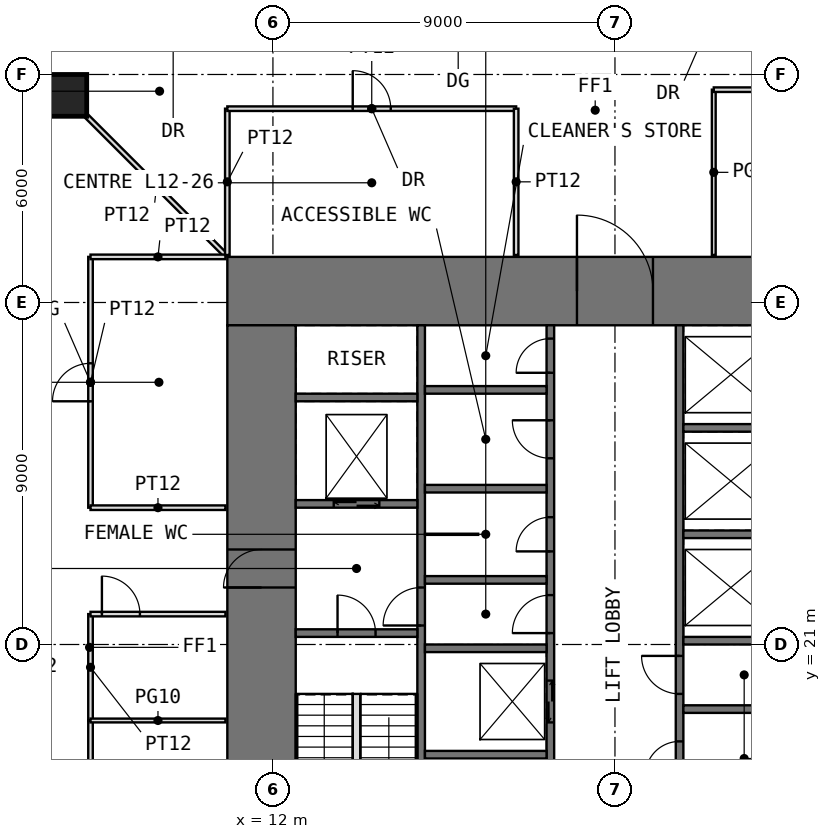
"""IFC4 building model, lengths in metres.
Left out: names, types, materials, properties, quantities, classifications, styles, units other than length and angle.
Written with IfcOpenShell. Run it as: python <this file> out.ifc"""

import sys

from ifc_helpers import new_model, si_unit, direction, frame, frame_2d, origin, origin_2d, place, context, subcontext, project, spatial, rectangle, extrude, element, fill, save


model = new_model("IFC4")
c1 = context("Model", 3, precision=1e-05, world=origin(), true_north=direction((0.0, 1.0)))
c2 = subcontext(c1, "Body", "Model", "MODEL_VIEW")
j1 = project(units=[si_unit("LENGTHUNIT", "METRE"), si_unit("PLANEANGLEUNIT", "RADIAN")], contexts=[c1])
p1 = place(None, origin())
s1 = spatial("IfcSite", under=j1, at=p1, CompositionType="ELEMENT")
p2 = place(p1, origin())
s2 = spatial("IfcBuilding", under=s1, at=p2, CompositionType="ELEMENT")
p3 = place(p2, frame((0.0, 0.0, 54.5)))
s3 = spatial("IfcBuildingStorey", under=s2, at=p3, CompositionType="ELEMENT", Elevation=54.5)
p4 = place(p3, frame((6.55, 35.45, 0.0), z_axis=(0.0, 0.0, 1.0), x_axis=(1.0, 0.0, 0.0)))
e1 = element("IfcColumn", 1, at=p4, inside=s3, PredefinedType="COLUMN", context=c2, shape_type="SweptSolid", body=[
    extrude(rectangle(XDim=1.1, YDim=1.1, at=origin_2d()), origin(), (0.0, 0.0, 1.0), 4.0),
])
p5 = place(p3, frame((10.8, 30.3, -0.05), z_axis=(0.0, 0.0, 1.0), x_axis=(1.0, 0.0, 0.0)))
e2 = element("IfcWall", 2, at=p5, inside=s3, PredefinedType="SHEAR", context=c2, shape_type="SweptSolid", body=[
    extrude(rectangle(XDim=20.4, YDim=1.8, at=frame_2d((10.2, 0.0))), origin(), (0.0, 0.0, 1.0), 4.0),
])
p6 = place(p5, frame((9.2, 0.0, 0.05)))
e3 = element("IfcOpeningElement", 3, at=p6, cuts=e2, PredefinedType="OPENING", context=c2, shape_type="SweptSolid", body=[
    extrude(rectangle(XDim=2.0, YDim=2.2, at=frame_2d((1.0, 1.1))), frame((0.0, 0.91, 0.0), z_axis=(0.0, -1.0, 0.0), x_axis=(1.0, 0.0, 0.0)), (0.0, 0.0, 1.0), 1.82),
])
p7 = place(p3, frame((11.7, 12.6, -0.05), z_axis=(0.0, 0.0, 1.0), x_axis=(0.0, 1.0, 0.0)))
e4 = element("IfcWall", 4, at=p7, inside=s3, PredefinedType="SHEAR", context=c2, shape_type="SweptSolid", body=[
    extrude(rectangle(XDim=16.8, YDim=1.8, at=frame_2d((8.4, 0.0))), origin(), (0.0, 0.0, 1.0), 4.0),
])
p8 = place(p7, frame((9.9, 0.0, 0.05)))
e5 = element("IfcOpeningElement", 5, at=p8, cuts=e4, PredefinedType="OPENING", context=c2, shape_type="SweptSolid", body=[
    extrude(rectangle(XDim=1.0, YDim=2.2, at=frame_2d((0.5, 1.1))), frame((0.0, 0.91, 0.0), z_axis=(0.0, -1.0, 0.0), x_axis=(1.0, 0.0, 0.0)), (0.0, 0.0, 1.0), 1.82),
])
p9 = place(p3, frame((15.9, 12.6, -0.05), z_axis=(0.0, 0.0, 1.0), x_axis=(0.0, 1.0, 0.0)))
e6 = element("IfcWall", 6, at=p9, inside=s3, PredefinedType="SHEAR", context=c2, shape_type="SweptSolid", body=[
    extrude(rectangle(XDim=16.8, YDim=0.2, at=frame_2d((8.4, 0.0))), origin(), (0.0, 0.0, 1.0), 4.0),
])
p10 = place(p9, frame((8.9, 0.0, 0.05)))
e7 = element("IfcOpeningElement", 7, at=p10, cuts=e6, PredefinedType="OPENING", context=c2, shape_type="SweptSolid", body=[
    extrude(rectangle(XDim=1.0, YDim=2.2, at=frame_2d((0.5, 1.1))), frame((0.0, 0.11, 0.0), z_axis=(0.0, -1.0, 0.0), x_axis=(1.0, 0.0, 0.0)), (0.0, 0.0, 1.0), 0.22),
])
p11 = place(p3, frame((19.3, 12.6, -0.05), z_axis=(0.0, 0.0, 1.0), x_axis=(0.0, 1.0, 0.0)))
e8 = element("IfcWall", 8, at=p11, inside=s3, PredefinedType="SHEAR", context=c2, shape_type="SweptSolid", body=[
    extrude(rectangle(XDim=16.8, YDim=0.2, at=frame_2d((8.4, 0.0))), origin(), (0.0, 0.0, 1.0), 4.0),
])
p12 = place(p11, frame((8.7, 0.0, 0.05)))
e9 = element("IfcOpeningElement", 9, at=p12, cuts=e8, PredefinedType="OPENING", context=c2, shape_type="SweptSolid", body=[
    extrude(rectangle(XDim=1.0, YDim=2.2, at=frame_2d((0.5, 1.1))), frame((0.0, 0.11, 0.0), z_axis=(0.0, -1.0, 0.0), x_axis=(1.0, 0.0, 0.0)), (0.0, 0.0, 1.0), 0.22),
])
p13 = place(p11, frame((10.85, 0.0, 0.05)))
e10 = element("IfcOpeningElement", 10, at=p13, cuts=e8, PredefinedType="OPENING", context=c2, shape_type="SweptSolid", body=[
    extrude(rectangle(XDim=0.9, YDim=2.2, at=frame_2d((0.45, 1.1))), frame((0.0, 0.11, 0.0), z_axis=(0.0, -1.0, 0.0), x_axis=(1.0, 0.0, 0.0)), (0.0, 0.0, 1.0), 0.22),
])
p14 = place(p11, frame((13.3, 0.0, 0.05)))
e11 = element("IfcOpeningElement", 11, at=p14, cuts=e8, PredefinedType="OPENING", context=c2, shape_type="SweptSolid", body=[
    extrude(rectangle(XDim=1.0, YDim=2.2, at=frame_2d((0.5, 1.1))), frame((0.0, 0.11, 0.0), z_axis=(0.0, -1.0, 0.0), x_axis=(1.0, 0.0, 0.0)), (0.0, 0.0, 1.0), 0.22),
])
p15 = place(p11, frame((15.55, 0.0, 0.05)))
e12 = element("IfcOpeningElement", 12, at=p15, cuts=e8, PredefinedType="OPENING", context=c2, shape_type="SweptSolid", body=[
    extrude(rectangle(XDim=0.9, YDim=2.2, at=frame_2d((0.45, 1.1))), frame((0.0, 0.11, 0.0), z_axis=(0.0, -1.0, 0.0), x_axis=(1.0, 0.0, 0.0)), (0.0, 0.0, 1.0), 0.22),
])
p16 = place(p11, frame((0.75, 0.0, 0.05)))
e13 = element("IfcOpeningElement", 13, at=p16, cuts=e8, PredefinedType="OPENING", context=c2, shape_type="SweptSolid", body=[
    extrude(rectangle(XDim=1.1, YDim=2.2, at=frame_2d((0.55, 1.1))), frame((0.0, 0.11, 0.0), z_axis=(0.0, -1.0, 0.0), x_axis=(1.0, 0.0, 0.0)), (0.0, 0.0, 1.0), 0.22),
])
p17 = place(p11, frame((3.55, 0.0, 0.05)))
e14 = element("IfcOpeningElement", 14, at=p17, cuts=e8, PredefinedType="OPENING", context=c2, shape_type="SweptSolid", body=[
    extrude(rectangle(XDim=1.1, YDim=2.2, at=frame_2d((0.55, 1.1))), frame((0.0, 0.11, 0.0), z_axis=(0.0, -1.0, 0.0), x_axis=(1.0, 0.0, 0.0)), (0.0, 0.0, 1.0), 0.22),
])
p18 = place(p11, frame((6.35, 0.0, 0.05)))
e15 = element("IfcOpeningElement", 15, at=p18, cuts=e8, PredefinedType="OPENING", context=c2, shape_type="SweptSolid", body=[
    extrude(rectangle(XDim=1.1, YDim=2.2, at=frame_2d((0.55, 1.1))), frame((0.0, 0.11, 0.0), z_axis=(0.0, -1.0, 0.0), x_axis=(1.0, 0.0, 0.0)), (0.0, 0.0, 1.0), 0.22),
])
p19 = place(p3, frame((22.7, 12.6, -0.05), z_axis=(0.0, 0.0, 1.0), x_axis=(0.0, 1.0, 0.0)))
e16 = element("IfcWall", 16, at=p19, inside=s3, PredefinedType="SHEAR", context=c2, shape_type="SweptSolid", body=[
    extrude(rectangle(XDim=16.8, YDim=0.2, at=frame_2d((8.4, 0.0))), origin(), (0.0, 0.0, 1.0), 4.0),
])
p20 = place(p19, frame((7.1, 0.0, 0.05)))
e17 = element("IfcOpeningElement", 17, at=p20, cuts=e16, PredefinedType="OPENING", context=c2, shape_type="SweptSolid", body=[
    extrude(rectangle(XDim=1.0, YDim=2.2, at=frame_2d((0.5, 1.1))), frame((0.0, 0.11, 0.0), z_axis=(0.0, -1.0, 0.0), x_axis=(1.0, 0.0, 0.0)), (0.0, 0.0, 1.0), 0.22),
])
p21 = place(p19, frame((1.55, 0.0, 0.05)))
e18 = element("IfcOpeningElement", 18, at=p21, cuts=e16, PredefinedType="OPENING", context=c2, shape_type="SweptSolid", body=[
    extrude(rectangle(XDim=0.9, YDim=2.2, at=frame_2d((0.45, 1.1))), frame((0.0, 0.11, 0.0), z_axis=(0.0, -1.0, 0.0), x_axis=(1.0, 0.0, 0.0)), (0.0, 0.0, 1.0), 0.22),
])
p22 = place(p19, frame((4.95, 0.0, 0.05)))
e19 = element("IfcOpeningElement", 19, at=p22, cuts=e16, PredefinedType="OPENING", context=c2, shape_type="SweptSolid", body=[
    extrude(rectangle(XDim=0.9, YDim=2.2, at=frame_2d((0.45, 1.1))), frame((0.0, 0.11, 0.0), z_axis=(0.0, -1.0, 0.0), x_axis=(1.0, 0.0, 0.0)), (0.0, 0.0, 1.0), 0.22),
])
p23 = place(p3, frame((12.6, 21.3, -0.05), z_axis=(0.0, 0.0, 1.0), x_axis=(1.0, 0.0, 0.0)))
e20 = element("IfcWall", 20, at=p23, inside=s3, PredefinedType="SHEAR", context=c2, shape_type="SweptSolid", body=[
    extrude(rectangle(XDim=3.2, YDim=0.2, at=frame_2d((1.6, 0.0))), origin(), (0.0, 0.0, 1.0), 4.0),
])
p24 = place(p23, frame((1.1, 0.0, 0.05)))
e21 = element("IfcOpeningElement", 21, at=p24, cuts=e20, PredefinedType="OPENING", context=c2, shape_type="SweptSolid", body=[
    extrude(rectangle(XDim=1.0, YDim=2.2, at=frame_2d((0.5, 1.1))), frame((0.0, 0.11, 0.0), z_axis=(0.0, -1.0, 0.0), x_axis=(1.0, 0.0, 0.0)), (0.0, 0.0, 1.0), 0.22),
])
p25 = place(p3, frame((12.6, 24.7, -0.05), z_axis=(0.0, 0.0, 1.0), x_axis=(1.0, 0.0, 0.0)))
e22 = element("IfcWall", 22, at=p25, inside=s3, PredefinedType="SHEAR", context=c2, shape_type="SweptSolid", body=[
    extrude(rectangle(XDim=3.2, YDim=0.2, at=frame_2d((1.6, 0.0))), origin(), (0.0, 0.0, 1.0), 4.0),
])
p26 = place(p25, frame((1.0, 0.0, 0.05)))
e23 = element("IfcOpeningElement", 23, at=p26, cuts=e22, PredefinedType="OPENING", context=c2, shape_type="SweptSolid", body=[
    extrude(rectangle(XDim=1.2, YDim=2.2, at=frame_2d((0.6, 1.1))), frame((0.0, 0.11, 0.0), z_axis=(0.0, -1.0, 0.0), x_axis=(1.0, 0.0, 0.0)), (0.0, 0.0, 1.0), 0.22),
])
for number, where, z_axis, x_axis in (
    (24, (12.6, 27.5, -0.05), (0.0, 0.0, 1.0), (1.0, 0.0, 0.0)),
    (25, (16.0, 18.1, -0.05), (0.0, 0.0, 1.0), (1.0, 0.0, 0.0)),
    (26, (16.0, 20.9, -0.05), (0.0, 0.0, 1.0), (1.0, 0.0, 0.0)),
    (27, (16.0, 22.7, -0.05), (0.0, 0.0, 1.0), (1.0, 0.0, 0.0)),
    (28, (16.0, 25.1, -0.05), (0.0, 0.0, 1.0), (1.0, 0.0, 0.0)),
    (29, (16.0, 27.7, -0.05), (0.0, 0.0, 1.0), (1.0, 0.0, 0.0)),
    (30, (22.8, 19.3, -0.05), (0.0, 0.0, 1.0), (1.0, 0.0, 0.0)),
    (31, (22.8, 21.1, -0.05), (0.0, 0.0, 1.0), (1.0, 0.0, 0.0)),
    (32, (22.8, 23.9, -0.05), (0.0, 0.0, 1.0), (1.0, 0.0, 0.0)),
    (33, (22.8, 26.7, -0.05), (0.0, 0.0, 1.0), (1.0, 0.0, 0.0)),
):
    element("IfcWall", number, at=place(p3, frame(where, z_axis=z_axis, x_axis=x_axis)), inside=s3, PredefinedType="SHEAR", context=c2, shape_type="SweptSolid", body=[
        extrude(rectangle(XDim=3.2, YDim=0.2, at=frame_2d((1.6, 0.0))), origin(), (0.0, 0.0, 1.0), 4.0),
    ])
p27 = place(p3, frame((16.0, 23.9, 0.0), z_axis=(0.0, 0.0, 1.0), x_axis=(1.0, 0.0, 0.0)))
e34 = element("IfcWall", 34, at=p27, inside=s3, PredefinedType="PARTITIONING", context=c2, shape_type="SweptSolid", body=[
    extrude(rectangle(XDim=1.4, YDim=0.03, at=frame_2d((0.7, 0.0))), origin(), (0.0, 0.0, 1.0), 3.75),
])
p28 = place(p3, frame((7.11, 34.89, 0.0), z_axis=(0.0, 0.0, 1.0), x_axis=(0.707106781187, -0.707106781187, 0.0)))
e35 = element("IfcWall", 35, at=p28, inside=s3, PredefinedType="PARTITIONING", context=c2, shape_type="SweptSolid", body=[
    extrude(rectangle(XDim=5.168, YDim=0.12, at=frame_2d((2.584, 0.0))), origin(), (0.0, 0.0, 1.0), 3.75),
])
p29 = place(p3, frame((7.2, 14.0, 0.0), z_axis=(0.0, 0.0, 1.0), x_axis=(0.0, 1.0, 0.0)))
e36 = element("IfcWall", 36, at=p29, inside=s3, PredefinedType="PARTITIONING", context=c2, shape_type="SweptSolid", body=[
    extrude(rectangle(XDim=5.0, YDim=0.12, at=frame_2d((2.5, 0.0))), origin(), (0.0, 0.0, 1.0), 3.75),
])
p30 = place(p29, frame((2.0, 0.0, 0.0)))
e37 = element("IfcOpeningElement", 37, at=p30, cuts=e36, PredefinedType="OPENING", context=c2, shape_type="SweptSolid", body=[
    extrude(rectangle(XDim=1.0, YDim=2.4, at=frame_2d((0.5, 1.2))), frame((0.0, 0.07, 0.0), z_axis=(0.0, -1.0, 0.0), x_axis=(1.0, 0.0, 0.0)), (0.0, 0.0, 1.0), 0.14),
])
p31 = place(p3, frame((7.2, 19.0, 0.0), z_axis=(0.0, 0.0, 1.0), x_axis=(0.0, 1.0, 0.0)))
e38 = element("IfcWall", 38, at=p31, inside=s3, PredefinedType="PARTITIONING", context=c2, shape_type="SweptSolid", body=[
    extrude(rectangle(XDim=2.8, YDim=0.12, at=frame_2d((1.4, 0.0))), origin(), (0.0, 0.0, 1.0), 3.75),
])
p32 = place(p3, frame((7.2, 19.0, 0.0), z_axis=(0.0, 0.0, 1.0), x_axis=(1.0, 0.0, 0.0)))
e39 = element("IfcWall", 39, at=p32, inside=s3, PredefinedType="PARTITIONING", context=c2, shape_type="SweptSolid", body=[
    extrude(rectangle(XDim=3.55, YDim=0.1, at=frame_2d((1.775, 0.0))), origin(), (0.0, 0.0, 1.0), 3.75),
])
p33 = place(p3, frame((7.2, 21.8, 0.0), z_axis=(0.0, 0.0, 1.0), x_axis=(1.0, 0.0, 0.0)))
e40 = element("IfcWall", 40, at=p33, inside=s3, PredefinedType="PARTITIONING", context=c2, shape_type="SweptSolid", body=[
    extrude(rectangle(XDim=3.55, YDim=0.12, at=frame_2d((1.775, 0.0))), origin(), (0.0, 0.0, 1.0), 3.75),
])
p34 = place(p33, frame((0.3, 0.0, 0.0)))
e41 = element("IfcOpeningElement", 41, at=p34, cuts=e40, PredefinedType="OPENING", context=c2, shape_type="SweptSolid", body=[
    extrude(rectangle(XDim=1.0, YDim=2.4, at=frame_2d((0.5, 1.2))), frame((0.0, 0.07, 0.0), z_axis=(0.0, -1.0, 0.0), x_axis=(1.0, 0.0, 0.0)), (0.0, 0.0, 1.0), 0.14),
])
p35 = place(p3, frame((7.2, 24.6, 0.0), z_axis=(0.0, 0.0, 1.0), x_axis=(0.0, 1.0, 0.0)))
e42 = element("IfcWall", 42, at=p35, inside=s3, PredefinedType="PARTITIONING", context=c2, shape_type="SweptSolid", body=[
    extrude(rectangle(XDim=6.6, YDim=0.12, at=frame_2d((3.3, 0.0))), origin(), (0.0, 0.0, 1.0), 3.75),
])
p36 = place(p35, frame((2.8, 0.0, 0.0)))
e43 = element("IfcOpeningElement", 43, at=p36, cuts=e42, PredefinedType="OPENING", context=c2, shape_type="SweptSolid", body=[
    extrude(rectangle(XDim=1.0, YDim=2.4, at=frame_2d((0.5, 1.2))), frame((0.0, 0.07, 0.0), z_axis=(0.0, -1.0, 0.0), x_axis=(1.0, 0.0, 0.0)), (0.0, 0.0, 1.0), 0.14),
])
for number, where, z_axis, x_axis in (
    (44, (7.2, 24.6, 0.0), (0.0, 0.0, 1.0), (1.0, 0.0, 0.0)),
    (45, (7.2, 31.2, 0.0), (0.0, 0.0, 1.0), (1.0, 0.0, 0.0)),
):
    element("IfcWall", number, at=place(p3, frame(where, z_axis=z_axis, x_axis=x_axis)), inside=s3, PredefinedType="PARTITIONING", context=c2, shape_type="SweptSolid", body=[
        extrude(rectangle(XDim=3.55, YDim=0.12, at=frame_2d((1.775, 0.0))), origin(), (0.0, 0.0, 1.0), 3.75),
    ])
p37 = place(p3, frame((10.8, 31.25, 0.0), z_axis=(0.0, 0.0, 1.0), x_axis=(0.0, 1.0, 0.0)))
e46 = element("IfcWall", 46, at=p37, inside=s3, PredefinedType="PARTITIONING", context=c2, shape_type="SweptSolid", body=[
    extrude(rectangle(XDim=3.85, YDim=0.12, at=frame_2d((1.925, 0.0))), origin(), (0.0, 0.0, 1.0), 3.75),
])
p38 = place(p3, frame((10.8, 35.1, 0.0), z_axis=(0.0, 0.0, 1.0), x_axis=(1.0, 0.0, 0.0)))
e47 = element("IfcWall", 47, at=p38, inside=s3, PredefinedType="PARTITIONING", context=c2, shape_type="SweptSolid", body=[
    extrude(rectangle(XDim=7.6, YDim=0.12, at=frame_2d((3.8, 0.0))), origin(), (0.0, 0.0, 1.0), 3.75),
])
p39 = place(p38, frame((3.3, 0.0, 0.0)))
e48 = element("IfcOpeningElement", 48, at=p39, cuts=e47, PredefinedType="OPENING", context=c2, shape_type="SweptSolid", body=[
    extrude(rectangle(XDim=1.0, YDim=2.2, at=frame_2d((0.5, 1.1))), frame((0.0, 0.07, 0.0), z_axis=(0.0, -1.0, 0.0), x_axis=(1.0, 0.0, 0.0)), (0.0, 0.0, 1.0), 0.14),
])
p40 = place(p3, frame((18.4, 31.25, 0.0), z_axis=(0.0, 0.0, 1.0), x_axis=(0.0, 1.0, 0.0)))
e49 = element("IfcWall", 49, at=p40, inside=s3, PredefinedType="PARTITIONING", context=c2, shape_type="SweptSolid", body=[
    extrude(rectangle(XDim=3.85, YDim=0.12, at=frame_2d((1.925, 0.0))), origin(), (0.0, 0.0, 1.0), 3.75),
])
p41 = place(p3, frame((23.6, 31.25, 0.0), z_axis=(0.0, 0.0, 1.0), x_axis=(0.0, 1.0, 0.0)))
e50 = element("IfcWall", 50, at=p41, inside=s3, PredefinedType="PARTITIONING", context=c2, shape_type="SweptSolid", body=[
    extrude(rectangle(XDim=4.35, YDim=0.1, at=frame_2d((2.175, 0.0))), origin(), (0.0, 0.0, 1.0), 3.75),
])
p42 = place(p3, frame((23.6, 35.6, 0.0), z_axis=(0.0, 0.0, 1.0), x_axis=(1.0, 0.0, 0.0)))
e51 = element("IfcWall", 51, at=p42, inside=s3, PredefinedType="PARTITIONING", context=c2, shape_type="SweptSolid", body=[
    extrude(rectangle(XDim=7.6, YDim=0.12, at=frame_2d((3.8, 0.0))), origin(), (0.0, 0.0, 1.0), 3.75),
])
p43 = place(p42, frame((3.3, 0.0, 0.0)))
e52 = element("IfcOpeningElement", 52, at=p43, cuts=e51, PredefinedType="OPENING", context=c2, shape_type="SweptSolid", body=[
    extrude(rectangle(XDim=1.0, YDim=2.4, at=frame_2d((0.5, 1.2))), frame((0.0, 0.07, 0.0), z_axis=(0.0, -1.0, 0.0), x_axis=(1.0, 0.0, 0.0)), (0.0, 0.0, 1.0), 0.14),
])
p44 = place(p3, frame((14.2, 16.62, 0.0), z_axis=(0.0, 0.0, 1.0), x_axis=(0.0, 1.0, 0.0)))
e53 = element("IfcWall", 53, at=p44, inside=s3, PredefinedType="PARTITIONING", context=c2, shape_type="SweptSolid", body=[
    extrude(rectangle(XDim=3.08, YDim=0.2, at=frame_2d((1.54, 0.0))), origin(), (0.0, 0.0, 1.0), 4.0),
])
p45 = place(p6, origin())
e54 = element("IfcDoor", 54, at=p45, inside=s3, OperationType="DOUBLE_DOOR_SINGLE_SWING", PredefinedType="DOOR", context=c2, shape_type="SweptSolid", body=[
    extrude(rectangle(XDim=2.0, YDim=2.2, at=frame_2d((1.0, 1.1))), frame((0.0, 0.025, 0.0), z_axis=(0.0, -1.0, 0.0), x_axis=(1.0, 0.0, 0.0)), (0.0, 0.0, 1.0), 0.05),
])
fill(e3, e54)
p46 = place(p8, origin())
e55 = element("IfcDoor", 55, at=p46, inside=s3, OperationType="SINGLE_SWING_LEFT", PredefinedType="DOOR", context=c2, shape_type="SweptSolid", body=[
    extrude(rectangle(XDim=1.0, YDim=2.2, at=frame_2d((0.5, 1.1))), frame((0.0, 0.025, 0.0), z_axis=(0.0, -1.0, 0.0), x_axis=(1.0, 0.0, 0.0)), (0.0, 0.0, 1.0), 0.05),
])
fill(e5, e55)
p47 = place(p24, origin())
e56 = element("IfcDoor", 56, at=p47, inside=s3, OperationType="SINGLE_SWING_LEFT", PredefinedType="DOOR", context=c2, shape_type="SweptSolid", body=[
    extrude(rectangle(XDim=1.0, YDim=2.2, at=frame_2d((0.5, 1.1))), frame((0.0, 0.025, 0.0), z_axis=(0.0, -1.0, 0.0), x_axis=(1.0, 0.0, 0.0)), (0.0, 0.0, 1.0), 0.05),
])
fill(e21, e56)
p48 = place(p10, origin())
e57 = element("IfcDoor", 57, at=p48, inside=s3, OperationType="SINGLE_SWING_LEFT", PredefinedType="DOOR", context=c2, shape_type="SweptSolid", body=[
    extrude(rectangle(XDim=1.0, YDim=2.2, at=frame_2d((0.5, 1.1))), frame((0.0, 0.025, 0.0), z_axis=(0.0, -1.0, 0.0), x_axis=(1.0, 0.0, 0.0)), (0.0, 0.0, 1.0), 0.05),
])
fill(e7, e57)
p49 = place(p12, origin())
e58 = element("IfcDoor", 58, at=p49, inside=s3, OperationType="SINGLE_SWING_LEFT", PredefinedType="DOOR", context=c2, shape_type="SweptSolid", body=[
    extrude(rectangle(XDim=1.0, YDim=2.2, at=frame_2d((0.5, 1.1))), frame((0.0, 0.025, 0.0), z_axis=(0.0, -1.0, 0.0), x_axis=(1.0, 0.0, 0.0)), (0.0, 0.0, 1.0), 0.05),
])
fill(e9, e58)
p50 = place(p20, origin())
e59 = element("IfcDoor", 59, at=p50, inside=s3, OperationType="SINGLE_SWING_RIGHT", PredefinedType="DOOR", context=c2, shape_type="SweptSolid", body=[
    extrude(rectangle(XDim=1.0, YDim=2.2, at=frame_2d((0.5, 1.1))), frame((0.0, 0.025, 0.0), z_axis=(0.0, -1.0, 0.0), x_axis=(1.0, 0.0, 0.0)), (0.0, 0.0, 1.0), 0.05),
])
fill(e17, e59)
p51 = place(p13, origin())
e60 = element("IfcDoor", 60, at=p51, inside=s3, OperationType="SINGLE_SWING_LEFT", PredefinedType="DOOR", context=c2, shape_type="SweptSolid", body=[
    extrude(rectangle(XDim=0.9, YDim=2.2, at=frame_2d((0.45, 1.1))), frame((0.0, 0.025, 0.0), z_axis=(0.0, -1.0, 0.0), x_axis=(1.0, 0.0, 0.0)), (0.0, 0.0, 1.0), 0.05),
])
fill(e10, e60)
p52 = place(p14, origin())
e61 = element("IfcDoor", 61, at=p52, inside=s3, OperationType="SINGLE_SWING_RIGHT", PredefinedType="DOOR", context=c2, shape_type="SweptSolid", body=[
    extrude(rectangle(XDim=1.0, YDim=2.2, at=frame_2d((0.5, 1.1))), frame((0.0, 0.025, 0.0), z_axis=(0.0, -1.0, 0.0), x_axis=(1.0, 0.0, 0.0)), (0.0, 0.0, 1.0), 0.05),
])
fill(e11, e61)
p53 = place(p15, origin())
e62 = element("IfcDoor", 62, at=p53, inside=s3, OperationType="SINGLE_SWING_LEFT", PredefinedType="DOOR", context=c2, shape_type="SweptSolid", body=[
    extrude(rectangle(XDim=0.9, YDim=2.2, at=frame_2d((0.45, 1.1))), frame((0.0, 0.025, 0.0), z_axis=(0.0, -1.0, 0.0), x_axis=(1.0, 0.0, 0.0)), (0.0, 0.0, 1.0), 0.05),
])
fill(e12, e62)
p54 = place(p22, origin())
e63 = element("IfcDoor", 63, at=p54, inside=s3, OperationType="SINGLE_SWING_LEFT", PredefinedType="DOOR", context=c2, shape_type="SweptSolid", body=[
    extrude(rectangle(XDim=0.9, YDim=2.2, at=frame_2d((0.45, 1.1))), frame((0.0, 0.025, 0.0), z_axis=(0.0, -1.0, 0.0), x_axis=(1.0, 0.0, 0.0)), (0.0, 0.0, 1.0), 0.05),
])
fill(e19, e63)
p55 = place(p39, origin())
e64 = element("IfcDoor", 64, at=p55, inside=s3, OperationType="SINGLE_SWING_LEFT", PredefinedType="DOOR", context=c2, shape_type="SweptSolid", body=[
    extrude(rectangle(XDim=1.0, YDim=2.2, at=frame_2d((0.5, 1.1))), frame((0.0, 0.025, 0.0), z_axis=(0.0, -1.0, 0.0), x_axis=(1.0, 0.0, 0.0)), (0.0, 0.0, 1.0), 0.05),
])
fill(e48, e64)
p56 = place(p36, origin())
e65 = element("IfcDoor", 65, at=p56, inside=s3, OperationType="SINGLE_SWING_LEFT", PredefinedType="DOOR", context=c2, shape_type="SweptSolid", body=[
    extrude(rectangle(XDim=1.0, YDim=2.4, at=frame_2d((0.5, 1.2))), frame((0.0, 0.025, 0.0), z_axis=(0.0, -1.0, 0.0), x_axis=(1.0, 0.0, 0.0)), (0.0, 0.0, 1.0), 0.05),
])
fill(e43, e65)
p57 = place(p34, origin())
e66 = element("IfcDoor", 66, at=p57, inside=s3, OperationType="SINGLE_SWING_LEFT", PredefinedType="DOOR", context=c2, shape_type="SweptSolid", body=[
    extrude(rectangle(XDim=1.0, YDim=2.4, at=frame_2d((0.5, 1.2))), frame((0.0, 0.025, 0.0), z_axis=(0.0, -1.0, 0.0), x_axis=(1.0, 0.0, 0.0)), (0.0, 0.0, 1.0), 0.05),
])
fill(e41, e66)
p58 = place(p18, origin())
e67 = element("IfcDoor", 67, at=p58, inside=s3, OperationType="DOUBLE_DOOR_SLIDING", PredefinedType="DOOR", context=c2, shape_type="SweptSolid", body=[
    extrude(rectangle(XDim=1.1, YDim=2.2, at=frame_2d((0.55, 1.1))), frame((0.0, 0.025, 0.0), z_axis=(0.0, -1.0, 0.0), x_axis=(1.0, 0.0, 0.0)), (0.0, 0.0, 1.0), 0.05),
])
fill(e15, e67)
p59 = place(p26, origin())
e68 = element("IfcDoor", 68, at=p59, inside=s3, OperationType="DOUBLE_DOOR_SLIDING", PredefinedType="DOOR", context=c2, shape_type="SweptSolid", body=[
    extrude(rectangle(XDim=1.2, YDim=2.2, at=frame_2d((0.6, 1.1))), frame((0.0, 0.025, 0.0), z_axis=(0.0, -1.0, 0.0), x_axis=(1.0, 0.0, 0.0)), (0.0, 0.0, 1.0), 0.05),
])
fill(e23, e68)
save(model, sys.argv[1])
